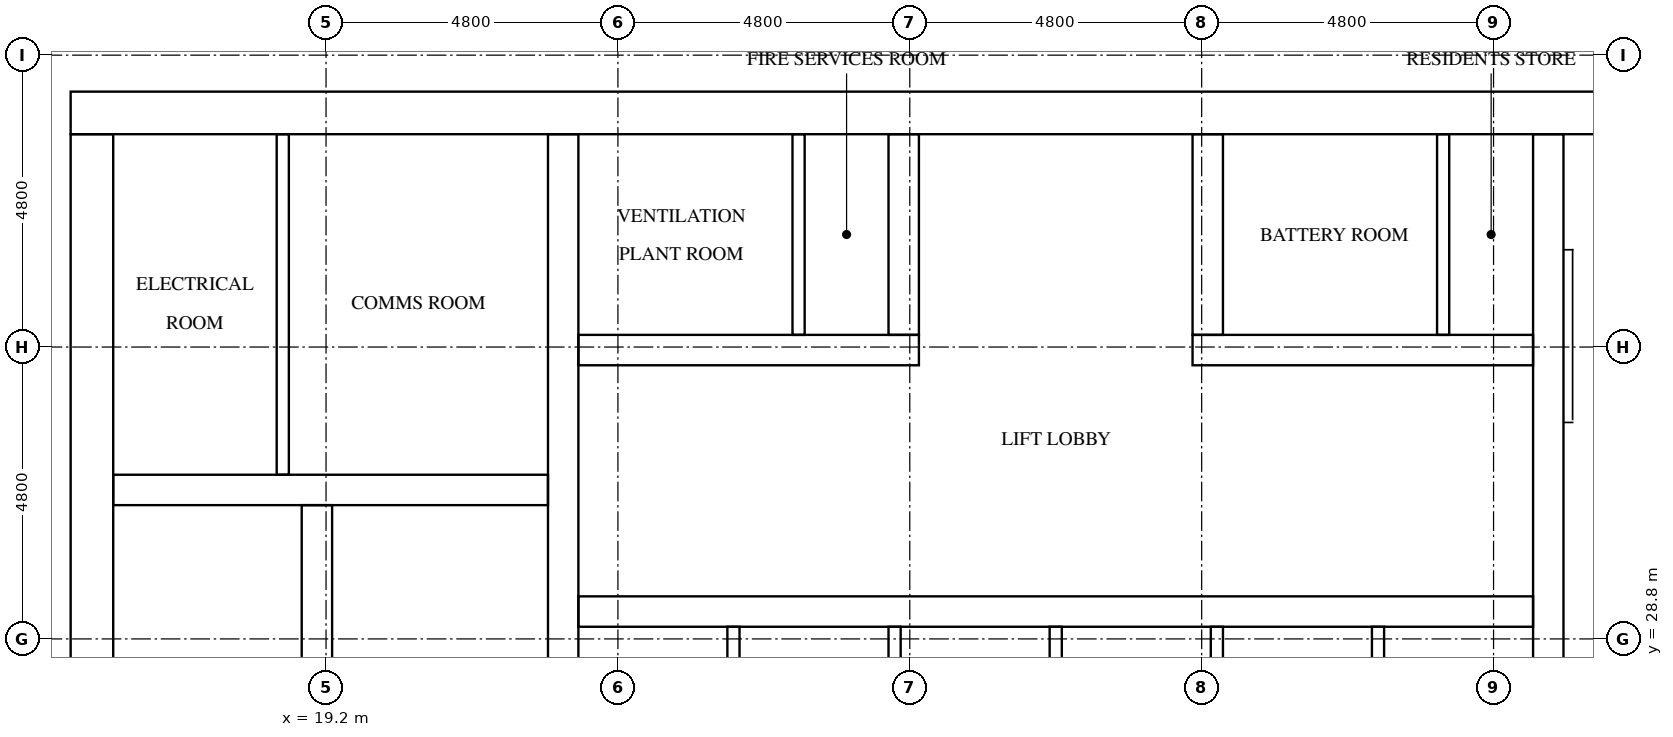
"""IFC4 building model, lengths in metres.
Left out: names, types, materials, properties, quantities, classifications, styles, units other than length and angle.
Written with IfcOpenShell. Run it as: python <this file> out.ifc"""

import sys

from ifc_helpers import new_model, si_unit, direction, frame, frame_2d, origin, place, context, subcontext, project, spatial, rectangle, extrude, element, fill, save


model = new_model("IFC4")
c1 = context("Model", 3, precision=1e-05, world=origin(), true_north=direction((0.0, 1.0)))
c2 = subcontext(c1, "Body", "Model", "MODEL_VIEW")
j1 = project(units=[si_unit("LENGTHUNIT", "METRE"), si_unit("PLANEANGLEUNIT", "RADIAN")], contexts=[c1])
p1 = place(None, origin())
s1 = spatial("IfcSite", under=j1, at=p1, CompositionType="ELEMENT")
p2 = place(p1, origin())
s2 = spatial("IfcBuilding", under=s1, at=p2, CompositionType="ELEMENT")
p3 = place(p2, frame((0.0, 0.0, 226.3)))
s3 = spatial("IfcBuildingStorey", under=s2, at=p3, CompositionType="ELEMENT", Elevation=226.3)
p4 = place(p3, frame((15.0, 37.45, 0.0), z_axis=(0.0, 0.0, 1.0), x_axis=(1.0, 0.0, 0.0)))
e1 = element("IfcWall", 1, at=p4, inside=s3, PredefinedType="SHEAR", context=c2, shape_type="SweptSolid", body=[
    extrude(rectangle(XDim=32.4, YDim=0.7, at=frame_2d((16.2, 0.0))), origin(), (0.0, 0.0, 1.0), 3.2),
])
p5 = place(p4, frame((15.3, 0.0, 0.0)))
e2 = element("IfcOpeningElement", 2, at=p5, cuts=e1, PredefinedType="OPENING", context=c2, shape_type="SweptSolid", body=[
    extrude(rectangle(XDim=1.8, YDim=2.1, at=frame_2d((0.9, 1.05))), frame((0.0, 0.36, 0.0), z_axis=(0.0, -1.0, 0.0), x_axis=(1.0, 0.0, 0.0)), (0.0, 0.0, 1.0), 0.72),
])
p6 = place(p4, frame((1.544, 0.0, 0.0)))
e3 = element("IfcOpeningElement", 3, at=p6, cuts=e1, PredefinedType="OPENING", context=c2, shape_type="SweptSolid", body=[
    extrude(rectangle(XDim=1.0, YDim=2.1, at=frame_2d((0.5, 1.05))), frame((0.0, 0.36, 0.0), z_axis=(0.0, -1.0, 0.0), x_axis=(1.0, 0.0, 0.0)), (0.0, 0.0, 1.0), 0.72),
])
p7 = place(p4, frame((5.219, 0.0, 0.0)))
e4 = element("IfcOpeningElement", 4, at=p7, cuts=e1, PredefinedType="OPENING", context=c2, shape_type="SweptSolid", body=[
    extrude(rectangle(XDim=1.0, YDim=2.1, at=frame_2d((0.5, 1.05))), frame((0.0, 0.36, 0.0), z_axis=(0.0, -1.0, 0.0), x_axis=(1.0, 0.0, 0.0)), (0.0, 0.0, 1.0), 0.72),
])
p8 = place(p3, frame((15.35, 15.7, 0.0), z_axis=(0.0, 0.0, 1.0), x_axis=(0.0, 1.0, 0.0)))
e5 = element("IfcWall", 5, at=p8, inside=s3, PredefinedType="SHEAR", context=c2, shape_type="SweptSolid", body=[
    extrude(rectangle(XDim=21.4, YDim=0.7, at=frame_2d((10.7, 0.0))), origin(), (0.0, 0.0, 1.0), 3.2),
])
p9 = place(p8, frame((5.06, 0.0, 0.0)))
e6 = element("IfcOpeningElement", 6, at=p9, cuts=e5, PredefinedType="OPENING", context=c2, shape_type="SweptSolid", body=[
    extrude(rectangle(XDim=1.2, YDim=2.1, at=frame_2d((0.6, 1.05))), frame((0.0, 0.36, 0.0), z_axis=(0.0, -1.0, 0.0), x_axis=(1.0, 0.0, 0.0)), (0.0, 0.0, 1.0), 0.72),
])
p10 = place(p3, frame((19.05, 15.7, 0.0), z_axis=(0.0, 0.0, 1.0), x_axis=(0.0, 1.0, 0.0)))
e7 = element("IfcWall", 7, at=p10, inside=s3, PredefinedType="SHEAR", context=c2, shape_type="SweptSolid", body=[
    extrude(rectangle(XDim=15.3, YDim=0.5, at=frame_2d((7.65, 0.0))), origin(), (0.0, 0.0, 1.0), 3.2),
])
p11 = place(p10, frame((9.75, 0.0, 0.0)))
e8 = element("IfcOpeningElement", 8, at=p11, cuts=e7, PredefinedType="OPENING", context=c2, shape_type="SweptSolid", body=[
    extrude(rectangle(XDim=1.1, YDim=2.1, at=frame_2d((0.55, 1.05))), frame((0.0, 0.26, 0.0), z_axis=(0.0, -1.0, 0.0), x_axis=(1.0, 0.0, 0.0)), (0.0, 0.0, 1.0), 0.52),
])
p12 = place(p10, frame((13.25, 0.0, 0.0)))
e9 = element("IfcOpeningElement", 9, at=p12, cuts=e7, PredefinedType="OPENING", context=c2, shape_type="SweptSolid", body=[
    extrude(rectangle(XDim=1.1, YDim=2.1, at=frame_2d((0.55, 1.05))), frame((0.0, 0.26, 0.0), z_axis=(0.0, -1.0, 0.0), x_axis=(1.0, 0.0, 0.0)), (0.0, 0.0, 1.0), 0.52),
])
p13 = place(p10, frame((0.5, 0.0, 0.0)))
e10 = element("IfcOpeningElement", 10, at=p13, cuts=e7, PredefinedType="OPENING", context=c2, shape_type="SweptSolid", body=[
    extrude(rectangle(XDim=1.2, YDim=2.1, at=frame_2d((0.6, 1.05))), frame((0.0, 0.26, 0.0), z_axis=(0.0, -1.0, 0.0), x_axis=(1.0, 0.0, 0.0)), (0.0, 0.0, 1.0), 0.52),
])
p14 = place(p3, frame((23.1, 15.7, 0.0), z_axis=(0.0, 0.0, 1.0), x_axis=(0.0, 1.0, 0.0)))
e11 = element("IfcWall", 11, at=p14, inside=s3, PredefinedType="SHEAR", context=c2, shape_type="SweptSolid", body=[
    extrude(rectangle(XDim=21.4, YDim=0.5, at=frame_2d((10.7, 0.0))), origin(), (0.0, 0.0, 1.0), 3.2),
])
p15 = place(p3, frame((39.3, 27.75, 0.0), z_axis=(0.0, 0.0, 1.0), x_axis=(0.0, 1.0, 0.0)))
e12 = element("IfcWall", 12, at=p15, inside=s3, PredefinedType="SHEAR", context=c2, shape_type="SweptSolid", body=[
    extrude(rectangle(XDim=9.35, YDim=0.5, at=frame_2d((4.675, 0.0))), origin(), (0.0, 0.0, 1.0), 3.2),
])
p16 = place(p3, frame((15.7, 31.25, 0.0), z_axis=(0.0, 0.0, 1.0), x_axis=(1.0, 0.0, 0.0)))
e13 = element("IfcWall", 13, at=p16, inside=s3, PredefinedType="SHEAR", context=c2, shape_type="SweptSolid", body=[
    extrude(rectangle(XDim=7.15, YDim=0.5, at=frame_2d((3.575, 0.0))), origin(), (0.0, 0.0, 1.0), 3.2),
])
p17 = place(p3, frame((23.35, 29.25, 0.0), z_axis=(0.0, 0.0, 1.0), x_axis=(1.0, 0.0, 0.0)))
e14 = element("IfcWall", 14, at=p17, inside=s3, PredefinedType="SHEAR", context=c2, shape_type="SweptSolid", body=[
    extrude(rectangle(XDim=15.7, YDim=0.5, at=frame_2d((7.85, 0.0))), origin(), (0.0, 0.0, 1.0), 3.2),
])
p18 = place(p17, frame((0.675, 0.0, 0.0)))
e15 = element("IfcOpeningElement", 15, at=p18, cuts=e14, PredefinedType="OPENING", context=c2, shape_type="SweptSolid", body=[
    extrude(rectangle(XDim=1.1, YDim=2.1, at=frame_2d((0.55, 1.05))), frame((0.0, 0.26, 0.0), z_axis=(0.0, -1.0, 0.0), x_axis=(1.0, 0.0, 0.0)), (0.0, 0.0, 1.0), 0.52),
])
p19 = place(p17, frame((3.325, 0.0, 0.0)))
e16 = element("IfcOpeningElement", 16, at=p19, cuts=e14, PredefinedType="OPENING", context=c2, shape_type="SweptSolid", body=[
    extrude(rectangle(XDim=1.1, YDim=2.1, at=frame_2d((0.55, 1.05))), frame((0.0, 0.26, 0.0), z_axis=(0.0, -1.0, 0.0), x_axis=(1.0, 0.0, 0.0)), (0.0, 0.0, 1.0), 0.52),
])
p20 = place(p17, frame((5.975, 0.0, 0.0)))
e17 = element("IfcOpeningElement", 17, at=p20, cuts=e14, PredefinedType="OPENING", context=c2, shape_type="SweptSolid", body=[
    extrude(rectangle(XDim=1.1, YDim=2.1, at=frame_2d((0.55, 1.05))), frame((0.0, 0.26, 0.0), z_axis=(0.0, -1.0, 0.0), x_axis=(1.0, 0.0, 0.0)), (0.0, 0.0, 1.0), 0.52),
])
p21 = place(p17, frame((8.625, 0.0, 0.0)))
e18 = element("IfcOpeningElement", 18, at=p21, cuts=e14, PredefinedType="OPENING", context=c2, shape_type="SweptSolid", body=[
    extrude(rectangle(XDim=1.1, YDim=2.1, at=frame_2d((0.55, 1.05))), frame((0.0, 0.26, 0.0), z_axis=(0.0, -1.0, 0.0), x_axis=(1.0, 0.0, 0.0)), (0.0, 0.0, 1.0), 0.52),
])
p22 = place(p17, frame((11.275, 0.0, 0.0)))
e19 = element("IfcOpeningElement", 19, at=p22, cuts=e14, PredefinedType="OPENING", context=c2, shape_type="SweptSolid", body=[
    extrude(rectangle(XDim=1.1, YDim=2.1, at=frame_2d((0.55, 1.05))), frame((0.0, 0.26, 0.0), z_axis=(0.0, -1.0, 0.0), x_axis=(1.0, 0.0, 0.0)), (0.0, 0.0, 1.0), 0.52),
])
p23 = place(p17, frame((13.925, 0.0, 0.0)))
e20 = element("IfcOpeningElement", 20, at=p23, cuts=e14, PredefinedType="OPENING", context=c2, shape_type="SweptSolid", body=[
    extrude(rectangle(XDim=1.1, YDim=2.1, at=frame_2d((0.55, 1.05))), frame((0.0, 0.26, 0.0), z_axis=(0.0, -1.0, 0.0), x_axis=(1.0, 0.0, 0.0)), (0.0, 0.0, 1.0), 0.52),
])
p24 = place(p3, frame((23.35, 33.55, 0.0), z_axis=(0.0, 0.0, 1.0), x_axis=(1.0, 0.0, 0.0)))
e21 = element("IfcWall", 21, at=p24, inside=s3, PredefinedType="SHEAR", context=c2, shape_type="SweptSolid", body=[
    extrude(rectangle(XDim=5.6, YDim=0.5, at=frame_2d((2.8, 0.0))), origin(), (0.0, 0.0, 1.0), 3.2),
])
p25 = place(p24, frame((1.26, 0.0, 0.0)))
e22 = element("IfcOpeningElement", 22, at=p25, cuts=e21, PredefinedType="OPENING", context=c2, shape_type="SweptSolid", body=[
    extrude(rectangle(XDim=1.0, YDim=2.1, at=frame_2d((0.5, 1.05))), frame((0.0, 0.26, 0.0), z_axis=(0.0, -1.0, 0.0), x_axis=(1.0, 0.0, 0.0)), (0.0, 0.0, 1.0), 0.52),
])
p26 = place(p24, frame((3.91, 0.0, 0.0)))
e23 = element("IfcOpeningElement", 23, at=p26, cuts=e21, PredefinedType="OPENING", context=c2, shape_type="SweptSolid", body=[
    extrude(rectangle(XDim=1.0, YDim=2.1, at=frame_2d((0.5, 1.05))), frame((0.0, 0.26, 0.0), z_axis=(0.0, -1.0, 0.0), x_axis=(1.0, 0.0, 0.0)), (0.0, 0.0, 1.0), 0.52),
])
p27 = place(p3, frame((33.45, 33.55, 0.0), z_axis=(0.0, 0.0, 1.0), x_axis=(1.0, 0.0, 0.0)))
e24 = element("IfcWall", 24, at=p27, inside=s3, PredefinedType="SHEAR", context=c2, shape_type="SweptSolid", body=[
    extrude(rectangle(XDim=5.6, YDim=0.5, at=frame_2d((2.8, 0.0))), origin(), (0.0, 0.0, 1.0), 3.2),
])
p28 = place(p27, frame((1.76, 0.0, 0.0)))
e25 = element("IfcOpeningElement", 25, at=p28, cuts=e24, PredefinedType="OPENING", context=c2, shape_type="SweptSolid", body=[
    extrude(rectangle(XDim=1.0, YDim=2.1, at=frame_2d((0.5, 1.05))), frame((0.0, 0.26, 0.0), z_axis=(0.0, -1.0, 0.0), x_axis=(1.0, 0.0, 0.0)), (0.0, 0.0, 1.0), 0.52),
])
p29 = place(p27, frame((4.41, 0.0, 0.0)))
e26 = element("IfcOpeningElement", 26, at=p29, cuts=e24, PredefinedType="OPENING", context=c2, shape_type="SweptSolid", body=[
    extrude(rectangle(XDim=1.0, YDim=2.1, at=frame_2d((0.5, 1.05))), frame((0.0, 0.26, 0.0), z_axis=(0.0, -1.0, 0.0), x_axis=(1.0, 0.0, 0.0)), (0.0, 0.0, 1.0), 0.52),
])
for number, where, z_axis, x_axis in (
    (27, (28.7, 33.8, 0.0), (0.0, 0.0, 1.0), (0.0, 1.0, 0.0)),
    (28, (33.7, 33.8, 0.0), (0.0, 0.0, 1.0), (0.0, 1.0, 0.0)),
):
    element("IfcWall", number, at=place(p3, frame(where, z_axis=z_axis, x_axis=x_axis)), inside=s3, PredefinedType="SHEAR", context=c2, shape_type="SweptSolid", body=[
        extrude(rectangle(XDim=3.3, YDim=0.5, at=frame_2d((1.65, 0.0))), origin(), (0.0, 0.0, 1.0), 3.2),
    ])
for number, where, z_axis, x_axis in (
    (29, (25.9, 26.4, 0.0), (0.0, 0.0, 1.0), (0.0, 1.0, 0.0)),
    (30, (28.55, 26.4, 0.0), (0.0, 0.0, 1.0), (0.0, 1.0, 0.0)),
    (31, (31.2, 26.4, 0.0), (0.0, 0.0, 1.0), (0.0, 1.0, 0.0)),
    (32, (33.85, 26.4, 0.0), (0.0, 0.0, 1.0), (0.0, 1.0, 0.0)),
    (33, (36.5, 26.4, 0.0), (0.0, 0.0, 1.0), (0.0, 1.0, 0.0)),
):
    element("IfcWall", number, at=place(p3, frame(where, z_axis=z_axis, x_axis=x_axis)), inside=s3, PredefinedType="SOLIDWALL", context=c2, shape_type="SweptSolid", body=[
        extrude(rectangle(XDim=2.6, YDim=0.2, at=frame_2d((1.3, 0.0))), origin(), (0.0, 0.0, 1.0), 3.2),
    ])
p30 = place(p3, frame((18.489, 31.5, 0.0), z_axis=(0.0, 0.0, 1.0), x_axis=(0.0, 1.0, 0.0)))
e34 = element("IfcWall", 34, at=p30, inside=s3, PredefinedType="PARTITIONING", context=c2, shape_type="SweptSolid", body=[
    extrude(rectangle(XDim=5.6, YDim=0.2, at=frame_2d((2.8, 0.0))), origin(), (0.0, 0.0, 1.0), 3.2),
])
for number, where, z_axis, x_axis in (
    (35, (26.971, 33.8, 0.0), (0.0, 0.0, 1.0), (0.0, 1.0, 0.0)),
    (36, (37.571, 33.8, 0.0), (0.0, 0.0, 1.0), (0.0, 1.0, 0.0)),
):
    element("IfcWall", number, at=place(p3, frame(where, z_axis=z_axis, x_axis=x_axis)), inside=s3, PredefinedType="PARTITIONING", context=c2, shape_type="SweptSolid", body=[
        extrude(rectangle(XDim=3.3, YDim=0.2, at=frame_2d((1.65, 0.0))), origin(), (0.0, 0.0, 1.0), 3.2),
    ])
p31 = place(p18, origin())
e37 = element("IfcDoor", 37, at=p31, inside=s3, OperationType="DOUBLE_DOOR_SLIDING", PredefinedType="DOOR", context=c2, shape_type="SweptSolid", body=[
    extrude(rectangle(XDim=1.1, YDim=2.1, at=frame_2d((0.55, 1.05))), frame((0.0, 0.025, 0.0), z_axis=(0.0, -1.0, 0.0), x_axis=(1.0, 0.0, 0.0)), (0.0, 0.0, 1.0), 0.05),
])
fill(e15, e37)
p32 = place(p19, origin())
e38 = element("IfcDoor", 38, at=p32, inside=s3, OperationType="DOUBLE_DOOR_SLIDING", PredefinedType="DOOR", context=c2, shape_type="SweptSolid", body=[
    extrude(rectangle(XDim=1.1, YDim=2.1, at=frame_2d((0.55, 1.05))), frame((0.0, 0.025, 0.0), z_axis=(0.0, -1.0, 0.0), x_axis=(1.0, 0.0, 0.0)), (0.0, 0.0, 1.0), 0.05),
])
fill(e16, e38)
p33 = place(p20, origin())
e39 = element("IfcDoor", 39, at=p33, inside=s3, OperationType="DOUBLE_DOOR_SLIDING", PredefinedType="DOOR", context=c2, shape_type="SweptSolid", body=[
    extrude(rectangle(XDim=1.1, YDim=2.1, at=frame_2d((0.55, 1.05))), frame((0.0, 0.025, 0.0), z_axis=(0.0, -1.0, 0.0), x_axis=(1.0, 0.0, 0.0)), (0.0, 0.0, 1.0), 0.05),
])
fill(e17, e39)
p34 = place(p21, origin())
e40 = element("IfcDoor", 40, at=p34, inside=s3, OperationType="DOUBLE_DOOR_SLIDING", PredefinedType="DOOR", context=c2, shape_type="SweptSolid", body=[
    extrude(rectangle(XDim=1.1, YDim=2.1, at=frame_2d((0.55, 1.05))), frame((0.0, 0.025, 0.0), z_axis=(0.0, -1.0, 0.0), x_axis=(1.0, 0.0, 0.0)), (0.0, 0.0, 1.0), 0.05),
])
fill(e18, e40)
p35 = place(p22, origin())
e41 = element("IfcDoor", 41, at=p35, inside=s3, OperationType="DOUBLE_DOOR_SLIDING", PredefinedType="DOOR", context=c2, shape_type="SweptSolid", body=[
    extrude(rectangle(XDim=1.1, YDim=2.1, at=frame_2d((0.55, 1.05))), frame((0.0, 0.025, 0.0), z_axis=(0.0, -1.0, 0.0), x_axis=(1.0, 0.0, 0.0)), (0.0, 0.0, 1.0), 0.05),
])
fill(e19, e41)
p36 = place(p23, origin())
e42 = element("IfcDoor", 42, at=p36, inside=s3, OperationType="DOUBLE_DOOR_SLIDING", PredefinedType="DOOR", context=c2, shape_type="SweptSolid", body=[
    extrude(rectangle(XDim=1.1, YDim=2.1, at=frame_2d((0.55, 1.05))), frame((0.0, 0.025, 0.0), z_axis=(0.0, -1.0, 0.0), x_axis=(1.0, 0.0, 0.0)), (0.0, 0.0, 1.0), 0.05),
])
fill(e20, e42)
p37 = place(p12, origin())
e43 = element("IfcDoor", 43, at=p37, inside=s3, OperationType="DOUBLE_DOOR_SLIDING", PredefinedType="DOOR", context=c2, shape_type="SweptSolid", body=[
    extrude(rectangle(XDim=1.1, YDim=2.1, at=frame_2d((0.55, 1.05))), frame((0.0, 0.025, 0.0), z_axis=(0.0, -1.0, 0.0), x_axis=(1.0, 0.0, 0.0)), (0.0, 0.0, 1.0), 0.05),
])
fill(e9, e43)
p38 = place(p5, origin())
e44 = element("IfcDoor", 44, at=p38, inside=s3, OperationType="DOUBLE_DOOR_SINGLE_SWING", PredefinedType="DOOR", context=c2, shape_type="SweptSolid", body=[
    extrude(rectangle(XDim=1.8, YDim=2.1, at=frame_2d((0.9, 1.05))), frame((0.0, 0.025, 0.0), z_axis=(0.0, -1.0, 0.0), x_axis=(1.0, 0.0, 0.0)), (0.0, 0.0, 1.0), 0.05),
])
fill(e2, e44)
p39 = place(p6, origin())
e45 = element("IfcDoor", 45, at=p39, inside=s3, OperationType="SINGLE_SWING_RIGHT", PredefinedType="DOOR", context=c2, shape_type="SweptSolid", body=[
    extrude(rectangle(XDim=1.0, YDim=2.1, at=frame_2d((0.5, 1.05))), frame((0.0, 0.025, 0.0), z_axis=(0.0, -1.0, 0.0), x_axis=(1.0, 0.0, 0.0)), (0.0, 0.0, 1.0), 0.05),
])
fill(e3, e45)
p40 = place(p7, origin())
e46 = element("IfcDoor", 46, at=p40, inside=s3, OperationType="SINGLE_SWING_LEFT", PredefinedType="DOOR", context=c2, shape_type="SweptSolid", body=[
    extrude(rectangle(XDim=1.0, YDim=2.1, at=frame_2d((0.5, 1.05))), frame((0.0, 0.025, 0.0), z_axis=(0.0, -1.0, 0.0), x_axis=(1.0, 0.0, 0.0)), (0.0, 0.0, 1.0), 0.05),
])
fill(e4, e46)
p41 = place(p25, frame((1.0, 0.0, 0.0), z_axis=(0.0, 0.0, 1.0), x_axis=(-1.0, 0.0, 0.0)))
e47 = element("IfcDoor", 47, at=p41, inside=s3, OperationType="SINGLE_SWING_LEFT", PredefinedType="DOOR", context=c2, shape_type="SweptSolid", body=[
    extrude(rectangle(XDim=1.0, YDim=2.1, at=frame_2d((0.5, 1.05))), frame((0.0, 0.025, 0.0), z_axis=(0.0, -1.0, 0.0), x_axis=(1.0, 0.0, 0.0)), (0.0, 0.0, 1.0), 0.05),
])
fill(e22, e47)
p42 = place(p26, frame((1.0, 0.0, 0.0), z_axis=(0.0, 0.0, 1.0), x_axis=(-1.0, 0.0, 0.0)))
e48 = element("IfcDoor", 48, at=p42, inside=s3, OperationType="SINGLE_SWING_RIGHT", PredefinedType="DOOR", context=c2, shape_type="SweptSolid", body=[
    extrude(rectangle(XDim=1.0, YDim=2.1, at=frame_2d((0.5, 1.05))), frame((0.0, 0.025, 0.0), z_axis=(0.0, -1.0, 0.0), x_axis=(1.0, 0.0, 0.0)), (0.0, 0.0, 1.0), 0.05),
])
fill(e23, e48)
p43 = place(p28, frame((1.0, 0.0, 0.0), z_axis=(0.0, 0.0, 1.0), x_axis=(-1.0, 0.0, 0.0)))
e49 = element("IfcDoor", 49, at=p43, inside=s3, OperationType="SINGLE_SWING_LEFT", PredefinedType="DOOR", context=c2, shape_type="SweptSolid", body=[
    extrude(rectangle(XDim=1.0, YDim=2.1, at=frame_2d((0.5, 1.05))), frame((0.0, 0.025, 0.0), z_axis=(0.0, -1.0, 0.0), x_axis=(1.0, 0.0, 0.0)), (0.0, 0.0, 1.0), 0.05),
])
fill(e25, e49)
p44 = place(p29, frame((1.0, 0.0, 0.0), z_axis=(0.0, 0.0, 1.0), x_axis=(-1.0, 0.0, 0.0)))
e50 = element("IfcDoor", 50, at=p44, inside=s3, OperationType="SINGLE_SWING_RIGHT", PredefinedType="DOOR", context=c2, shape_type="SweptSolid", body=[
    extrude(rectangle(XDim=1.0, YDim=2.1, at=frame_2d((0.5, 1.05))), frame((0.0, 0.025, 0.0), z_axis=(0.0, -1.0, 0.0), x_axis=(1.0, 0.0, 0.0)), (0.0, 0.0, 1.0), 0.05),
])
fill(e26, e50)
save(model, sys.argv[1])
